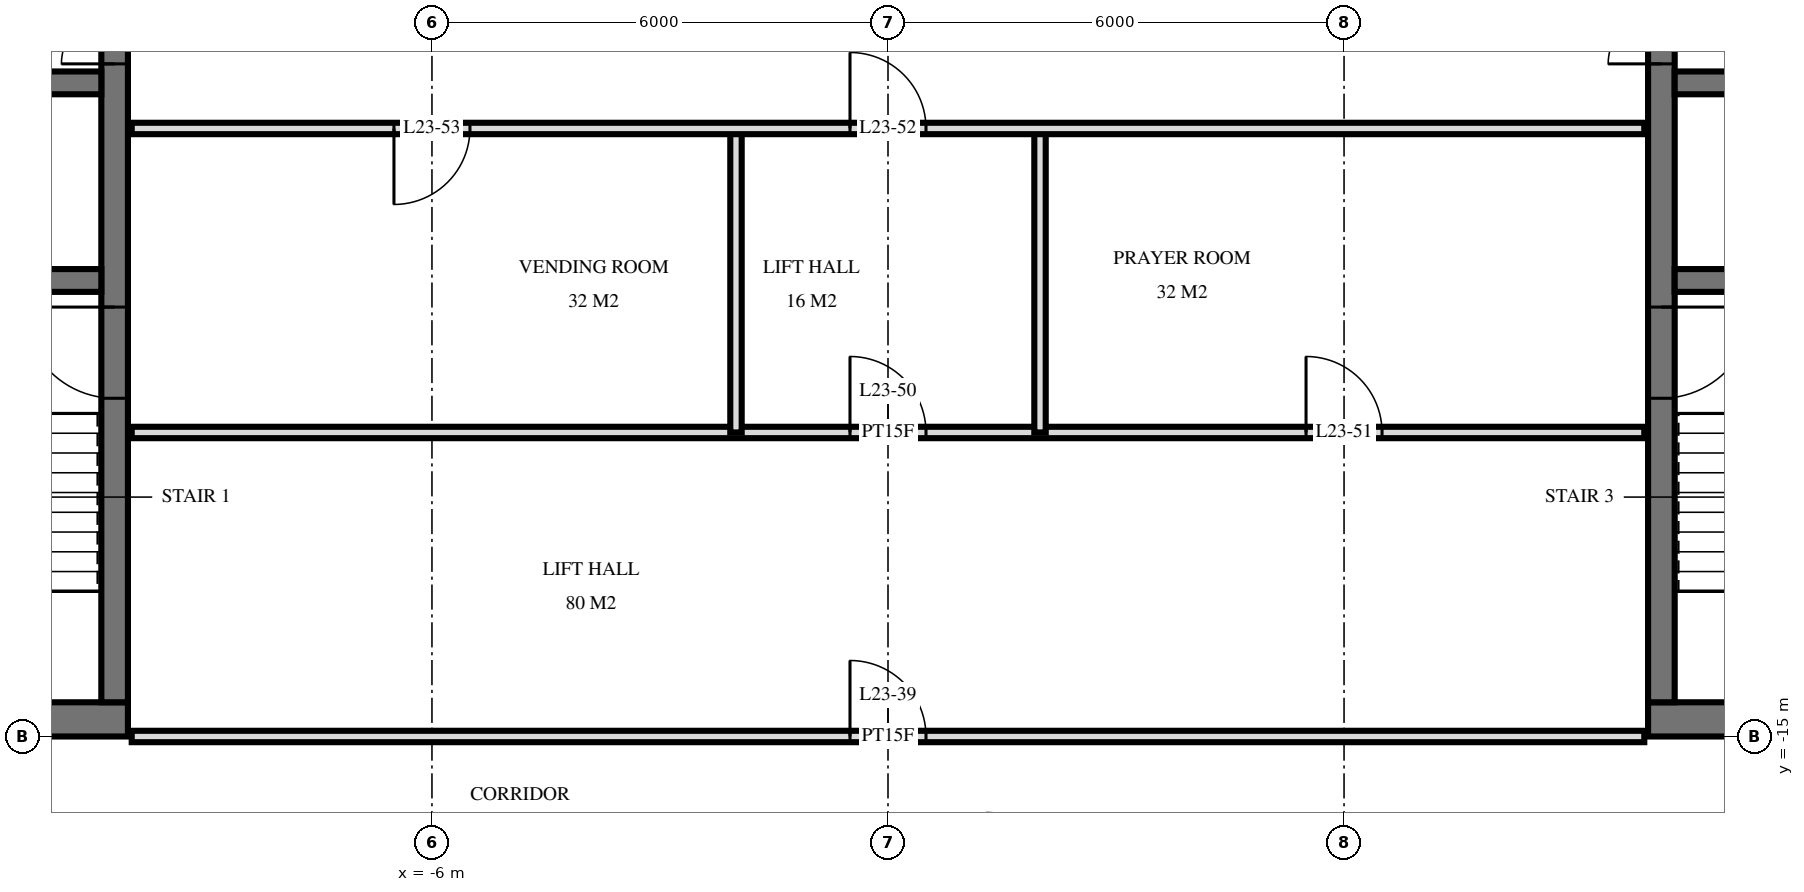
"""IFC4 building model, lengths in metres.
Left out: names, types, materials, properties, quantities, classifications, styles, units other than length and angle.
Written with IfcOpenShell. Run it as: python <this file> out.ifc"""

import sys

from ifc_helpers import new_model, si_unit, direction, frame, frame_2d, origin, place, context, subcontext, project, spatial, rectangle, extrude, element, fill, save


model = new_model("IFC4")
c1 = context("Model", 3, precision=1e-05, world=origin(), true_north=direction((0.0, 1.0)))
c2 = subcontext(c1, "Body", "Model", "MODEL_VIEW")
j1 = project(units=[si_unit("LENGTHUNIT", "METRE"), si_unit("PLANEANGLEUNIT", "RADIAN")], contexts=[c1])
p1 = place(None, origin())
s1 = spatial("IfcSite", under=j1, at=p1, CompositionType="ELEMENT")
p2 = place(p1, origin())
s2 = spatial("IfcBuilding", under=s1, at=p2, CompositionType="ELEMENT")
p3 = place(p2, frame((0.0, 0.0, 92.4)))
s3 = spatial("IfcBuildingStorey", under=s2, at=p3, CompositionType="ELEMENT", Elevation=92.4)
p4 = place(p3, frame((-29.5, -14.775, 0.0), z_axis=(0.0, 0.0, 1.0), x_axis=(1.0, 0.0, 0.0)))
e1 = element("IfcWall", 1, at=p4, inside=s3, PredefinedType="SHEAR", context=c2, shape_type="SweptSolid", body=[
    extrude(rectangle(XDim=19.5, YDim=0.45, at=frame_2d((9.75, 0.0))), origin(), (0.0, 0.0, 1.0), 3.6),
])
p5 = place(p4, frame((11.2, 0.0, 0.0)))
e2 = element("IfcOpeningElement", 2, at=p5, cuts=e1, PredefinedType="OPENING", context=c2, shape_type="SweptSolid", body=[
    extrude(rectangle(XDim=1.2, YDim=2.1, at=frame_2d((0.6, 1.05))), frame((0.0, 0.235, 0.0), z_axis=(0.0, -1.0, 0.0), x_axis=(1.0, 0.0, 0.0)), (0.0, 0.0, 1.0), 0.47),
])
p6 = place(p4, frame((14.25, 0.0, 0.0)))
e3 = element("IfcOpeningElement", 3, at=p6, cuts=e1, PredefinedType="OPENING", context=c2, shape_type="SweptSolid", body=[
    extrude(rectangle(XDim=1.1, YDim=2.1, at=frame_2d((0.55, 1.05))), frame((0.0, 0.235, 0.0), z_axis=(0.0, -1.0, 0.0), x_axis=(1.0, 0.0, 0.0)), (0.0, 0.0, 1.0), 0.47),
])
p7 = place(p4, frame((8.5, 0.0, 0.0)))
e4 = element("IfcOpeningElement", 4, at=p7, cuts=e1, PredefinedType="OPENING", context=c2, shape_type="SweptSolid", body=[
    extrude(rectangle(XDim=0.9, YDim=2.1, at=frame_2d((0.45, 1.05))), frame((0.0, 0.235, 0.0), z_axis=(0.0, -1.0, 0.0), x_axis=(1.0, 0.0, 0.0)), (0.0, 0.0, 1.0), 0.47),
])
p8 = place(p4, frame((6.05, 0.0, 0.0)))
e5 = element("IfcOpeningElement", 5, at=p8, cuts=e1, PredefinedType="OPENING", context=c2, shape_type="SweptSolid", body=[
    extrude(rectangle(XDim=1.0, YDim=2.1, at=frame_2d((0.5, 1.05))), frame((0.0, 0.235, 0.0), z_axis=(0.0, -1.0, 0.0), x_axis=(1.0, 0.0, 0.0)), (0.0, 0.0, 1.0), 0.47),
])
p9 = place(p4, frame((3.587, 0.0, 0.0)))
e6 = element("IfcOpeningElement", 6, at=p9, cuts=e1, PredefinedType="OPENING", context=c2, shape_type="SweptSolid", body=[
    extrude(rectangle(XDim=1.0, YDim=2.1, at=frame_2d((0.5, 1.05))), frame((0.0, 0.235, 0.0), z_axis=(0.0, -1.0, 0.0), x_axis=(1.0, 0.0, 0.0)), (0.0, 0.0, 1.0), 0.47),
])
p10 = place(p4, frame((1.85, 0.0, 0.0)))
e7 = element("IfcOpeningElement", 7, at=p10, cuts=e1, PredefinedType="OPENING", context=c2, shape_type="SweptSolid", body=[
    extrude(rectangle(XDim=1.0, YDim=2.1, at=frame_2d((0.5, 1.05))), frame((0.0, 0.235, 0.0), z_axis=(0.0, -1.0, 0.0), x_axis=(1.0, 0.0, 0.0)), (0.0, 0.0, 1.0), 0.47),
])
p11 = place(p4, frame((0.55, 0.0, 0.0)))
e8 = element("IfcOpeningElement", 8, at=p11, cuts=e1, PredefinedType="OPENING", context=c2, shape_type="SweptSolid", body=[
    extrude(rectangle(XDim=1.0, YDim=2.1, at=frame_2d((0.5, 1.05))), frame((0.0, 0.235, 0.0), z_axis=(0.0, -1.0, 0.0), x_axis=(1.0, 0.0, 0.0)), (0.0, 0.0, 1.0), 0.47),
])
p12 = place(p3, frame((-10.175, -14.55, 0.0), z_axis=(0.0, 0.0, 1.0), x_axis=(0.0, 1.0, 0.0)))
e9 = element("IfcWall", 9, at=p12, inside=s3, PredefinedType="SHEAR", context=c2, shape_type="SweptSolid", body=[
    extrude(rectangle(XDim=14.1, YDim=0.35, at=frame_2d((7.05, 0.0))), origin(), (0.0, 0.0, 1.0), 3.6),
])
p13 = place(p12, frame((8.4, 0.0, 0.0)))
e10 = element("IfcOpeningElement", 10, at=p13, cuts=e9, PredefinedType="OPENING", context=c2, shape_type="SweptSolid", body=[
    extrude(rectangle(XDim=1.4, YDim=2.4, at=frame_2d((0.7, 1.2))), frame((0.0, 0.185, 0.0), z_axis=(0.0, -1.0, 0.0), x_axis=(1.0, 0.0, 0.0)), (0.0, 0.0, 1.0), 0.37),
])
p14 = place(p12, frame((10.0, 0.0, 0.0)))
e11 = element("IfcOpeningElement", 11, at=p14, cuts=e9, PredefinedType="OPENING", context=c2, shape_type="SweptSolid", body=[
    extrude(rectangle(XDim=1.4, YDim=2.4, at=frame_2d((0.7, 1.2))), frame((0.0, 0.185, 0.0), z_axis=(0.0, -1.0, 0.0), x_axis=(1.0, 0.0, 0.0)), (0.0, 0.0, 1.0), 0.37),
])
p15 = place(p12, frame((4.0, 0.0, 0.0)))
e12 = element("IfcOpeningElement", 12, at=p15, cuts=e9, PredefinedType="OPENING", context=c2, shape_type="SweptSolid", body=[
    extrude(rectangle(XDim=1.2, YDim=2.1, at=frame_2d((0.6, 1.05))), frame((0.0, 0.185, 0.0), z_axis=(0.0, -1.0, 0.0), x_axis=(1.0, 0.0, 0.0)), (0.0, 0.0, 1.0), 0.37),
])
p16 = place(p3, frame((-29.05, -6.4, 0.0), z_axis=(0.0, 0.0, 1.0), x_axis=(1.0, 0.0, 0.0)))
e13 = element("IfcWall", 13, at=p16, inside=s3, PredefinedType="SHEAR", context=c2, shape_type="SweptSolid", body=[
    extrude(rectangle(XDim=18.7, YDim=0.3, at=frame_2d((9.35, 0.0))), origin(), (0.0, 0.0, 1.0), 3.6),
])
p17 = place(p16, frame((2.95, 0.0, 0.0)))
e14 = element("IfcOpeningElement", 14, at=p17, cuts=e13, PredefinedType="OPENING", context=c2, shape_type="SweptSolid", body=[
    extrude(rectangle(XDim=1.1, YDim=2.1, at=frame_2d((0.55, 1.05))), frame((0.0, 0.16, 0.0), z_axis=(0.0, -1.0, 0.0), x_axis=(1.0, 0.0, 0.0)), (0.0, 0.0, 1.0), 0.32),
])
p18 = place(p16, frame((0.55, 0.0, 0.0)))
e15 = element("IfcOpeningElement", 15, at=p18, cuts=e13, PredefinedType="OPENING", context=c2, shape_type="SweptSolid", body=[
    extrude(rectangle(XDim=1.1, YDim=2.1, at=frame_2d((0.55, 1.05))), frame((0.0, 0.16, 0.0), z_axis=(0.0, -1.0, 0.0), x_axis=(1.0, 0.0, 0.0)), (0.0, 0.0, 1.0), 0.32),
])
p19 = place(p16, frame((10.8, 0.0, 0.0)))
e16 = element("IfcOpeningElement", 16, at=p19, cuts=e13, PredefinedType="OPENING", context=c2, shape_type="SweptSolid", body=[
    extrude(rectangle(XDim=1.1, YDim=2.1, at=frame_2d((0.55, 1.05))), frame((0.0, 0.16, 0.0), z_axis=(0.0, -1.0, 0.0), x_axis=(1.0, 0.0, 0.0)), (0.0, 0.0, 1.0), 0.32),
])
p20 = place(p16, frame((5.6, 0.0, 0.0)))
e17 = element("IfcOpeningElement", 17, at=p20, cuts=e13, PredefinedType="OPENING", context=c2, shape_type="SweptSolid", body=[
    extrude(rectangle(XDim=1.0, YDim=2.1, at=frame_2d((0.5, 1.05))), frame((0.0, 0.16, 0.0), z_axis=(0.0, -1.0, 0.0), x_axis=(1.0, 0.0, 0.0)), (0.0, 0.0, 1.0), 0.32),
])
p21 = place(p3, frame((-29.05, -9.0, 0.0), z_axis=(0.0, 0.0, 1.0), x_axis=(1.0, 0.0, 0.0)))
e18 = element("IfcWall", 18, at=p21, inside=s3, PredefinedType="SHEAR", context=c2, shape_type="SweptSolid", body=[
    extrude(rectangle(XDim=18.7, YDim=0.3, at=frame_2d((9.35, 0.0))), origin(), (0.0, 0.0, 1.0), 3.6),
])
p22 = place(p21, frame((13.8, 0.0, 0.0)))
e19 = element("IfcOpeningElement", 19, at=p22, cuts=e18, PredefinedType="OPENING", context=c2, shape_type="SweptSolid", body=[
    extrude(rectangle(XDim=1.1, YDim=2.1, at=frame_2d((0.55, 1.05))), frame((0.0, 0.16, 0.0), z_axis=(0.0, -1.0, 0.0), x_axis=(1.0, 0.0, 0.0)), (0.0, 0.0, 1.0), 0.32),
])
p23 = place(p3, frame((10.0, -14.775, 0.0), z_axis=(0.0, 0.0, 1.0), x_axis=(1.0, 0.0, 0.0)))
e20 = element("IfcWall", 20, at=p23, inside=s3, PredefinedType="SHEAR", context=c2, shape_type="SweptSolid", body=[
    extrude(rectangle(XDim=19.5, YDim=0.45, at=frame_2d((9.75, 0.0))), origin(), (0.0, 0.0, 1.0), 3.6),
])
p24 = place(p23, frame((7.1, 0.0, 0.0)))
e21 = element("IfcOpeningElement", 21, at=p24, cuts=e20, PredefinedType="OPENING", context=c2, shape_type="SweptSolid", body=[
    extrude(rectangle(XDim=1.2, YDim=2.1, at=frame_2d((0.6, 1.05))), frame((0.0, 0.235, 0.0), z_axis=(0.0, -1.0, 0.0), x_axis=(1.0, 0.0, 0.0)), (0.0, 0.0, 1.0), 0.47),
])
p25 = place(p23, frame((4.15, 0.0, 0.0)))
e22 = element("IfcOpeningElement", 22, at=p25, cuts=e20, PredefinedType="OPENING", context=c2, shape_type="SweptSolid", body=[
    extrude(rectangle(XDim=1.1, YDim=2.1, at=frame_2d((0.55, 1.05))), frame((0.0, 0.235, 0.0), z_axis=(0.0, -1.0, 0.0), x_axis=(1.0, 0.0, 0.0)), (0.0, 0.0, 1.0), 0.47),
])
p26 = place(p23, frame((10.1, 0.0, 0.0)))
e23 = element("IfcOpeningElement", 23, at=p26, cuts=e20, PredefinedType="OPENING", context=c2, shape_type="SweptSolid", body=[
    extrude(rectangle(XDim=0.9, YDim=2.1, at=frame_2d((0.45, 1.05))), frame((0.0, 0.235, 0.0), z_axis=(0.0, -1.0, 0.0), x_axis=(1.0, 0.0, 0.0)), (0.0, 0.0, 1.0), 0.47),
])
p27 = place(p23, frame((12.45, 0.0, 0.0)))
e24 = element("IfcOpeningElement", 24, at=p27, cuts=e20, PredefinedType="OPENING", context=c2, shape_type="SweptSolid", body=[
    extrude(rectangle(XDim=1.0, YDim=2.1, at=frame_2d((0.5, 1.05))), frame((0.0, 0.235, 0.0), z_axis=(0.0, -1.0, 0.0), x_axis=(1.0, 0.0, 0.0)), (0.0, 0.0, 1.0), 0.47),
])
p28 = place(p23, frame((14.913, 0.0, 0.0)))
e25 = element("IfcOpeningElement", 25, at=p28, cuts=e20, PredefinedType="OPENING", context=c2, shape_type="SweptSolid", body=[
    extrude(rectangle(XDim=1.0, YDim=2.1, at=frame_2d((0.5, 1.05))), frame((0.0, 0.235, 0.0), z_axis=(0.0, -1.0, 0.0), x_axis=(1.0, 0.0, 0.0)), (0.0, 0.0, 1.0), 0.47),
])
p29 = place(p23, frame((16.65, 0.0, 0.0)))
e26 = element("IfcOpeningElement", 26, at=p29, cuts=e20, PredefinedType="OPENING", context=c2, shape_type="SweptSolid", body=[
    extrude(rectangle(XDim=1.0, YDim=2.1, at=frame_2d((0.5, 1.05))), frame((0.0, 0.235, 0.0), z_axis=(0.0, -1.0, 0.0), x_axis=(1.0, 0.0, 0.0)), (0.0, 0.0, 1.0), 0.47),
])
p30 = place(p23, frame((18.025, 0.0, 0.0)))
e27 = element("IfcOpeningElement", 27, at=p30, cuts=e20, PredefinedType="OPENING", context=c2, shape_type="SweptSolid", body=[
    extrude(rectangle(XDim=1.0, YDim=2.1, at=frame_2d((0.5, 1.05))), frame((0.0, 0.235, 0.0), z_axis=(0.0, -1.0, 0.0), x_axis=(1.0, 0.0, 0.0)), (0.0, 0.0, 1.0), 0.47),
])
p31 = place(p3, frame((10.175, -14.55, 0.0), z_axis=(0.0, 0.0, 1.0), x_axis=(0.0, 1.0, 0.0)))
e28 = element("IfcWall", 28, at=p31, inside=s3, PredefinedType="SHEAR", context=c2, shape_type="SweptSolid", body=[
    extrude(rectangle(XDim=14.1, YDim=0.35, at=frame_2d((7.05, 0.0))), origin(), (0.0, 0.0, 1.0), 3.6),
])
p32 = place(p31, frame((8.4, 0.0, 0.0)))
e29 = element("IfcOpeningElement", 29, at=p32, cuts=e28, PredefinedType="OPENING", context=c2, shape_type="SweptSolid", body=[
    extrude(rectangle(XDim=1.4, YDim=2.4, at=frame_2d((0.7, 1.2))), frame((0.0, 0.185, 0.0), z_axis=(0.0, -1.0, 0.0), x_axis=(1.0, 0.0, 0.0)), (0.0, 0.0, 1.0), 0.37),
])
p33 = place(p31, frame((10.0, 0.0, 0.0)))
e30 = element("IfcOpeningElement", 30, at=p33, cuts=e28, PredefinedType="OPENING", context=c2, shape_type="SweptSolid", body=[
    extrude(rectangle(XDim=1.4, YDim=2.4, at=frame_2d((0.7, 1.2))), frame((0.0, 0.185, 0.0), z_axis=(0.0, -1.0, 0.0), x_axis=(1.0, 0.0, 0.0)), (0.0, 0.0, 1.0), 0.37),
])
p34 = place(p31, frame((4.0, 0.0, 0.0)))
e31 = element("IfcOpeningElement", 31, at=p34, cuts=e28, PredefinedType="OPENING", context=c2, shape_type="SweptSolid", body=[
    extrude(rectangle(XDim=1.2, YDim=2.1, at=frame_2d((0.6, 1.05))), frame((0.0, 0.185, 0.0), z_axis=(0.0, -1.0, 0.0), x_axis=(1.0, 0.0, 0.0)), (0.0, 0.0, 1.0), 0.37),
])
p35 = place(p3, frame((10.35, -6.4, 0.0), z_axis=(0.0, 0.0, 1.0), x_axis=(1.0, 0.0, 0.0)))
e32 = element("IfcWall", 32, at=p35, inside=s3, PredefinedType="SHEAR", context=c2, shape_type="SweptSolid", body=[
    extrude(rectangle(XDim=18.7, YDim=0.3, at=frame_2d((9.35, 0.0))), origin(), (0.0, 0.0, 1.0), 3.6),
])
p36 = place(p35, frame((14.65, 0.0, 0.0)))
e33 = element("IfcOpeningElement", 33, at=p36, cuts=e32, PredefinedType="OPENING", context=c2, shape_type="SweptSolid", body=[
    extrude(rectangle(XDim=1.1, YDim=2.1, at=frame_2d((0.55, 1.05))), frame((0.0, 0.16, 0.0), z_axis=(0.0, -1.0, 0.0), x_axis=(1.0, 0.0, 0.0)), (0.0, 0.0, 1.0), 0.32),
])
p37 = place(p35, frame((17.05, 0.0, 0.0)))
e34 = element("IfcOpeningElement", 34, at=p37, cuts=e32, PredefinedType="OPENING", context=c2, shape_type="SweptSolid", body=[
    extrude(rectangle(XDim=1.1, YDim=2.1, at=frame_2d((0.55, 1.05))), frame((0.0, 0.16, 0.0), z_axis=(0.0, -1.0, 0.0), x_axis=(1.0, 0.0, 0.0)), (0.0, 0.0, 1.0), 0.32),
])
p38 = place(p35, frame((6.8, 0.0, 0.0)))
e35 = element("IfcOpeningElement", 35, at=p38, cuts=e32, PredefinedType="OPENING", context=c2, shape_type="SweptSolid", body=[
    extrude(rectangle(XDim=1.1, YDim=2.1, at=frame_2d((0.55, 1.05))), frame((0.0, 0.16, 0.0), z_axis=(0.0, -1.0, 0.0), x_axis=(1.0, 0.0, 0.0)), (0.0, 0.0, 1.0), 0.32),
])
p39 = place(p35, frame((12.1, 0.0, 0.0)))
e36 = element("IfcOpeningElement", 36, at=p39, cuts=e32, PredefinedType="OPENING", context=c2, shape_type="SweptSolid", body=[
    extrude(rectangle(XDim=1.0, YDim=2.1, at=frame_2d((0.5, 1.05))), frame((0.0, 0.16, 0.0), z_axis=(0.0, -1.0, 0.0), x_axis=(1.0, 0.0, 0.0)), (0.0, 0.0, 1.0), 0.32),
])
p40 = place(p3, frame((10.35, -9.0, 0.0), z_axis=(0.0, 0.0, 1.0), x_axis=(1.0, 0.0, 0.0)))
e37 = element("IfcWall", 37, at=p40, inside=s3, PredefinedType="SHEAR", context=c2, shape_type="SweptSolid", body=[
    extrude(rectangle(XDim=18.7, YDim=0.3, at=frame_2d((9.35, 0.0))), origin(), (0.0, 0.0, 1.0), 3.6),
])
p41 = place(p40, frame((3.8, 0.0, 0.0)))
e38 = element("IfcOpeningElement", 38, at=p41, cuts=e37, PredefinedType="OPENING", context=c2, shape_type="SweptSolid", body=[
    extrude(rectangle(XDim=1.1, YDim=2.1, at=frame_2d((0.55, 1.05))), frame((0.0, 0.16, 0.0), z_axis=(0.0, -1.0, 0.0), x_axis=(1.0, 0.0, 0.0)), (0.0, 0.0, 1.0), 0.32),
])
for number, where, z_axis, x_axis in (
    (39, (2.0, -11.0, 0.0), (0.0, 0.0, 1.0), (0.0, 1.0, 0.0)),
    (40, (-2.0, -11.0, 0.0), (0.0, 0.0, 1.0), (0.0, 1.0, 0.0)),
):
    element("IfcWall", number, at=place(p3, frame(where, z_axis=z_axis, x_axis=x_axis)), inside=s3, PredefinedType="PARTITIONING", context=c2, shape_type="SweptSolid", body=[
        extrude(rectangle(XDim=4.0, YDim=0.15, at=frame_2d((2.0, 0.0))), origin(), (0.0, 0.0, 1.0), 3.32),
    ])
p42 = place(p3, frame((-9.95, -15.0, 0.0), z_axis=(0.0, 0.0, 1.0), x_axis=(1.0, 0.0, 0.0)))
e41 = element("IfcWall", 41, at=p42, inside=s3, PredefinedType="PARTITIONING", context=c2, shape_type="SweptSolid", body=[
    extrude(rectangle(XDim=19.9, YDim=0.15, at=frame_2d((9.95, 0.0))), origin(), (0.0, 0.0, 1.0), 2.684),
])
p43 = place(p42, frame((9.45, 0.0, 0.0)))
e42 = element("IfcOpeningElement", 42, at=p43, cuts=e41, PredefinedType="OPENING", context=c2, shape_type="SweptSolid", body=[
    extrude(rectangle(XDim=1.0, YDim=2.1, at=frame_2d((0.5, 1.05))), frame((0.0, 0.085, 0.0), z_axis=(0.0, -1.0, 0.0), x_axis=(1.0, 0.0, 0.0)), (0.0, 0.0, 1.0), 0.17),
])
p44 = place(p3, frame((-9.95, -11.0, 0.0), z_axis=(0.0, 0.0, 1.0), x_axis=(1.0, 0.0, 0.0)))
e43 = element("IfcWall", 43, at=p44, inside=s3, PredefinedType="PARTITIONING", context=c2, shape_type="SweptSolid", body=[
    extrude(rectangle(XDim=19.9, YDim=0.15, at=frame_2d((9.95, 0.0))), origin(), (0.0, 0.0, 1.0), 3.32),
])
p45 = place(p44, frame((9.45, 0.0, 0.0)))
e44 = element("IfcOpeningElement", 44, at=p45, cuts=e43, PredefinedType="OPENING", context=c2, shape_type="SweptSolid", body=[
    extrude(rectangle(XDim=1.0, YDim=2.1, at=frame_2d((0.5, 1.05))), frame((0.0, 0.085, 0.0), z_axis=(0.0, -1.0, 0.0), x_axis=(1.0, 0.0, 0.0)), (0.0, 0.0, 1.0), 0.17),
])
p46 = place(p44, frame((15.45, 0.0, 0.0)))
e45 = element("IfcOpeningElement", 45, at=p46, cuts=e43, PredefinedType="OPENING", context=c2, shape_type="SweptSolid", body=[
    extrude(rectangle(XDim=1.0, YDim=2.1, at=frame_2d((0.5, 1.05))), frame((0.0, 0.085, 0.0), z_axis=(0.0, -1.0, 0.0), x_axis=(1.0, 0.0, 0.0)), (0.0, 0.0, 1.0), 0.17),
])
p47 = place(p3, frame((-9.95, -7.0, 0.0), z_axis=(0.0, 0.0, 1.0), x_axis=(1.0, 0.0, 0.0)))
e46 = element("IfcWall", 46, at=p47, inside=s3, PredefinedType="PARTITIONING", context=c2, shape_type="SweptSolid", body=[
    extrude(rectangle(XDim=19.9, YDim=0.15, at=frame_2d((9.95, 0.0))), origin(), (0.0, 0.0, 1.0), 3.32),
])
p48 = place(p47, frame((9.45, 0.0, 0.0)))
e47 = element("IfcOpeningElement", 47, at=p48, cuts=e46, PredefinedType="OPENING", context=c2, shape_type="SweptSolid", body=[
    extrude(rectangle(XDim=1.0, YDim=2.1, at=frame_2d((0.5, 1.05))), frame((0.0, 0.085, 0.0), z_axis=(0.0, -1.0, 0.0), x_axis=(1.0, 0.0, 0.0)), (0.0, 0.0, 1.0), 0.17),
])
p49 = place(p47, frame((3.45, 0.0, 0.0)))
e48 = element("IfcOpeningElement", 48, at=p49, cuts=e46, PredefinedType="OPENING", context=c2, shape_type="SweptSolid", body=[
    extrude(rectangle(XDim=1.0, YDim=2.1, at=frame_2d((0.5, 1.05))), frame((0.0, 0.085, 0.0), z_axis=(0.0, -1.0, 0.0), x_axis=(1.0, 0.0, 0.0)), (0.0, 0.0, 1.0), 0.17),
])
p50 = place(p13, origin())
e49 = element("IfcDoor", 49, at=p50, inside=s3, OperationType="DOUBLE_DOOR_SINGLE_SWING", PredefinedType="DOOR", context=c2, shape_type="SweptSolid", body=[
    extrude(rectangle(XDim=1.4, YDim=2.4, at=frame_2d((0.7, 1.2))), frame((0.0, 0.025, 0.0), z_axis=(0.0, -1.0, 0.0), x_axis=(1.0, 0.0, 0.0)), (0.0, 0.0, 1.0), 0.05),
])
fill(e10, e49)
p51 = place(p15, origin())
e50 = element("IfcDoor", 50, at=p51, inside=s3, OperationType="SINGLE_SWING_LEFT", PredefinedType="DOOR", context=c2, shape_type="SweptSolid", body=[
    extrude(rectangle(XDim=1.2, YDim=2.1, at=frame_2d((0.6, 1.05))), frame((0.0, 0.025, 0.0), z_axis=(0.0, -1.0, 0.0), x_axis=(1.0, 0.0, 0.0)), (0.0, 0.0, 1.0), 0.05),
])
fill(e12, e50)
p52 = place(p32, origin())
e51 = element("IfcDoor", 51, at=p52, inside=s3, OperationType="DOUBLE_DOOR_SINGLE_SWING", PredefinedType="DOOR", context=c2, shape_type="SweptSolid", body=[
    extrude(rectangle(XDim=1.4, YDim=2.4, at=frame_2d((0.7, 1.2))), frame((0.0, 0.025, 0.0), z_axis=(0.0, -1.0, 0.0), x_axis=(1.0, 0.0, 0.0)), (0.0, 0.0, 1.0), 0.05),
])
fill(e29, e51)
p53 = place(p34, frame((0.6, 0.0, 0.0), z_axis=(0.0, 0.0, 1.0), x_axis=(-1.0, 0.0, 0.0)))
e52 = element("IfcDoor", 52, at=p53, inside=s3, OperationType="SINGLE_SWING_RIGHT", PredefinedType="DOOR", context=c2, shape_type="SweptSolid", body=[
    extrude(rectangle(XDim=1.2, YDim=2.1, at=frame_2d((0.0, 1.05))), frame((0.0, -0.025, 0.0), z_axis=(0.0, 1.0, 0.0), x_axis=(-1.0, 0.0, 0.0)), (0.0, 0.0, 1.0), 0.05),
])
fill(e31, e52)
p54 = place(p43, origin())
e53 = element("IfcDoor", 53, at=p54, inside=s3, OperationType="SINGLE_SWING_RIGHT", PredefinedType="DOOR", context=c2, shape_type="SweptSolid", body=[
    extrude(rectangle(XDim=1.0, YDim=2.1, at=frame_2d((0.5, 1.05))), frame((0.0, 0.025, 0.0), z_axis=(0.0, -1.0, 0.0), x_axis=(1.0, 0.0, 0.0)), (0.0, 0.0, 1.0), 0.05),
])
fill(e42, e53)
p55 = place(p45, origin())
e54 = element("IfcDoor", 54, at=p55, inside=s3, OperationType="SINGLE_SWING_RIGHT", PredefinedType="DOOR", context=c2, shape_type="SweptSolid", body=[
    extrude(rectangle(XDim=1.0, YDim=2.1, at=frame_2d((0.5, 1.05))), frame((0.0, 0.025, 0.0), z_axis=(0.0, -1.0, 0.0), x_axis=(1.0, 0.0, 0.0)), (0.0, 0.0, 1.0), 0.05),
])
fill(e44, e54)
p56 = place(p46, origin())
e55 = element("IfcDoor", 55, at=p56, inside=s3, OperationType="SINGLE_SWING_RIGHT", PredefinedType="DOOR", context=c2, shape_type="SweptSolid", body=[
    extrude(rectangle(XDim=1.0, YDim=2.1, at=frame_2d((0.5, 1.05))), frame((0.0, 0.025, 0.0), z_axis=(0.0, -1.0, 0.0), x_axis=(1.0, 0.0, 0.0)), (0.0, 0.0, 1.0), 0.05),
])
fill(e45, e55)
p57 = place(p48, origin())
e56 = element("IfcDoor", 56, at=p57, inside=s3, OperationType="SINGLE_SWING_RIGHT", PredefinedType="DOOR", context=c2, shape_type="SweptSolid", body=[
    extrude(rectangle(XDim=1.0, YDim=2.1, at=frame_2d((0.5, 1.05))), frame((0.0, 0.025, 0.0), z_axis=(0.0, -1.0, 0.0), x_axis=(1.0, 0.0, 0.0)), (0.0, 0.0, 1.0), 0.05),
])
fill(e47, e56)
p58 = place(p49, frame((0.5, 0.0, 0.0), z_axis=(0.0, 0.0, 1.0), x_axis=(-1.0, 0.0, 0.0)))
e57 = element("IfcDoor", 57, at=p58, inside=s3, OperationType="SINGLE_SWING_LEFT", PredefinedType="DOOR", context=c2, shape_type="SweptSolid", body=[
    extrude(rectangle(XDim=1.0, YDim=2.1, at=frame_2d((0.0, 1.05))), frame((0.0, -0.025, 0.0), z_axis=(0.0, 1.0, 0.0), x_axis=(-1.0, 0.0, 0.0)), (0.0, 0.0, 1.0), 0.05),
])
fill(e48, e57)
save(model, sys.argv[1])
